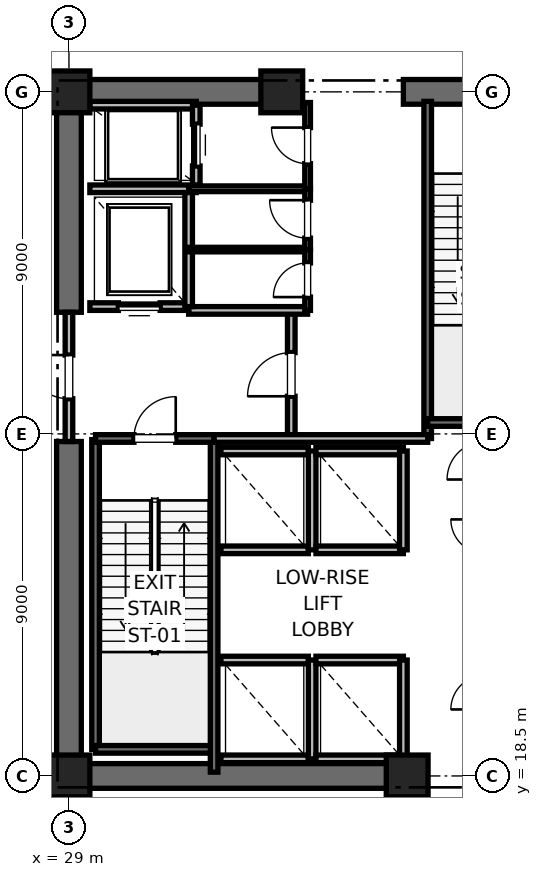
"""IFC4 building model, lengths in metres.
Left out: names, types, materials, properties, quantities, classifications, styles, units other than length and angle.
Written with IfcOpenShell. Run it as: python <this file> out.ifc"""

import sys

from ifc_helpers import new_model, si_unit, direction, frame, frame_2d, origin, origin_2d, place, context, subcontext, project, spatial, rectangle, extrude, element, fill, save


model = new_model("IFC4")
c1 = context("Model", 3, precision=1e-05, world=origin(), true_north=direction((0.0, 1.0)))
c2 = subcontext(c1, "Body", "Model", "MODEL_VIEW")
j1 = project(units=[si_unit("LENGTHUNIT", "METRE"), si_unit("PLANEANGLEUNIT", "RADIAN")], contexts=[c1])
p1 = place(None, origin())
s1 = spatial("IfcSite", under=j1, at=p1, CompositionType="ELEMENT")
p2 = place(p1, origin())
s2 = spatial("IfcBuilding", under=s1, at=p2, CompositionType="ELEMENT")
p3 = place(p2, frame((0.0, 0.0, 11.2)))
s3 = spatial("IfcBuildingStorey", under=s2, at=p3, CompositionType="ELEMENT", Elevation=11.2)
for number, where, z_axis, x_axis in (
    (1, (29.0, 18.5, 0.0), (0.0, 0.0, 1.0), (1.0, 0.0, 0.0)),
    (2, (29.0, 36.5, 0.0), (0.0, 0.0, 1.0), (1.0, 0.0, 0.0)),
    (3, (37.9, 18.5, 0.0), (0.0, 0.0, 1.0), (1.0, 0.0, 0.0)),
    (4, (34.6, 36.5, 0.0), (0.0, 0.0, 1.0), (1.0, 0.0, 0.0)),
):
    element("IfcColumn", number, at=place(p3, frame(where, z_axis=z_axis, x_axis=x_axis)), inside=s3, PredefinedType="PILASTER", context=c2, shape_type="SweptSolid", body=[
        extrude(rectangle(XDim=1.1, YDim=1.1, at=origin_2d()), origin(), (0.0, 0.0, 1.0), 5.2),
    ])
p4 = place(p3, frame((29.0, 18.5, 0.0), z_axis=(0.0, 0.0, 1.0), x_axis=(1.0, 0.0, 0.0)))
e5 = element("IfcWall", 5, at=p4, inside=s3, PredefinedType="SHEAR", context=c2, shape_type="SweptSolid", body=[
    extrude(rectangle(XDim=9.2, YDim=0.65, at=frame_2d((4.6, 0.0))), origin(), (0.0, 0.0, 1.0), 4.92),
])
p5 = place(p3, frame((29.0, 36.5, 0.0), z_axis=(0.0, 0.0, 1.0), x_axis=(1.0, 0.0, 0.0)))
e6 = element("IfcWall", 6, at=p5, inside=s3, PredefinedType="SHEAR", context=c2, shape_type="SweptSolid", body=[
    extrude(rectangle(XDim=5.8, YDim=0.65, at=frame_2d((2.9, 0.0))), origin(), (0.0, 0.0, 1.0), 4.92),
])
p6 = place(p3, frame((37.8, 36.5, 0.0), z_axis=(0.0, 0.0, 1.0), x_axis=(1.0, 0.0, 0.0)))
e7 = element("IfcWall", 7, at=p6, inside=s3, PredefinedType="SHEAR", context=c2, shape_type="SweptSolid", body=[
    extrude(rectangle(XDim=4.4, YDim=0.65, at=frame_2d((2.2, 0.0))), origin(), (0.0, 0.0, 1.0), 4.92),
])
p7 = place(p6, frame((1.65, 0.0, 0.0)))
e8 = element("IfcOpeningElement", 8, at=p7, cuts=e7, PredefinedType="OPENING", context=c2, shape_type="SweptSolid", body=[
    extrude(rectangle(XDim=1.1, YDim=2.15, at=frame_2d((0.55, 1.075))), frame((0.0, 0.325, 0.0), z_axis=(0.0, -1.0, 0.0), x_axis=(1.0, 0.0, 0.0)), (0.0, 0.0, 1.0), 0.65),
])
p8 = place(p3, frame((29.0, 18.5, 0.0), z_axis=(0.0, 0.0, 1.0), x_axis=(0.0, 1.0, 0.0)))
e9 = element("IfcWall", 9, at=p8, inside=s3, PredefinedType="SHEAR", context=c2, shape_type="SweptSolid", body=[
    extrude(rectangle(XDim=8.8, YDim=0.65, at=frame_2d((4.4, 0.0))), origin(), (0.0, 0.0, 1.0), 4.92),
])
p9 = place(p3, frame((29.0, 30.7, 0.0), z_axis=(0.0, 0.0, 1.0), x_axis=(0.0, 1.0, 0.0)))
e10 = element("IfcWall", 10, at=p9, inside=s3, PredefinedType="SHEAR", context=c2, shape_type="SweptSolid", body=[
    extrude(rectangle(XDim=5.8, YDim=0.65, at=frame_2d((2.9, 0.0))), origin(), (0.0, 0.0, 1.0), 4.92),
])
p10 = place(p3, frame((29.7, 19.2, 0.0), z_axis=(0.0, 0.0, 1.0), x_axis=(0.0, 1.0, 0.0)))
e11 = element("IfcWall", 11, at=p10, inside=s3, PredefinedType="SOLIDWALL", context=c2, shape_type="SweptSolid", body=[
    extrude(rectangle(XDim=8.15, YDim=0.2, at=frame_2d((4.075, 0.0))), origin(), (0.0, 0.0, 1.0), 4.92),
])
p11 = place(p3, frame((29.7, 19.2, 0.0), z_axis=(0.0, 0.0, 1.0), x_axis=(1.0, 0.0, 0.0)))
e12 = element("IfcWall", 12, at=p11, inside=s3, PredefinedType="SOLIDWALL", context=c2, shape_type="SweptSolid", body=[
    extrude(rectangle(XDim=3.12, YDim=0.2, at=frame_2d((1.56, 0.0))), origin(), (0.0, 0.0, 1.0), 4.92),
])
p12 = place(p3, frame((32.82, 18.6, 0.0), z_axis=(0.0, 0.0, 1.0), x_axis=(0.0, 1.0, 0.0)))
e13 = element("IfcWall", 13, at=p12, inside=s3, PredefinedType="SOLIDWALL", context=c2, shape_type="SweptSolid", body=[
    extrude(rectangle(XDim=8.78, YDim=0.2, at=frame_2d((4.39, 0.0))), origin(), (0.0, 0.0, 1.0), 4.92),
])
p13 = place(p3, frame((29.7, 27.38, 0.0), z_axis=(0.0, 0.0, 1.0), x_axis=(1.0, 0.0, 0.0)))
e14 = element("IfcWall", 14, at=p13, inside=s3, PredefinedType="SOLIDWALL", context=c2, shape_type="SweptSolid", body=[
    extrude(rectangle(XDim=3.12, YDim=0.2, at=frame_2d((1.56, 0.0))), origin(), (0.0, 0.0, 1.0), 4.92),
])
p14 = place(p13, frame((1.01, 0.0, 0.0)))
e15 = element("IfcOpeningElement", 15, at=p14, cuts=e14, PredefinedType="OPENING", context=c2, shape_type="SweptSolid", body=[
    extrude(rectangle(XDim=1.1, YDim=2.15, at=frame_2d((0.55, 1.075))), frame((0.0, 0.1, 0.0), z_axis=(0.0, -1.0, 0.0), x_axis=(1.0, 0.0, 0.0)), (0.0, 0.0, 1.0), 0.2),
])
p15 = place(p3, frame((38.44, 27.38, 0.0), z_axis=(0.0, 0.0, 1.0), x_axis=(0.0, 1.0, 0.0)))
e16 = element("IfcWall", 16, at=p15, inside=s3, PredefinedType="SOLIDWALL", context=c2, shape_type="SweptSolid", body=[
    extrude(rectangle(XDim=8.87, YDim=0.2, at=frame_2d((4.435, 0.0))), origin(), (0.0, 0.0, 1.0), 4.92),
])
p16 = place(p3, frame((38.44, 27.8, 0.0), z_axis=(0.0, 0.0, 1.0), x_axis=(1.0, 0.0, 0.0)))
e17 = element("IfcWall", 17, at=p16, inside=s3, PredefinedType="SOLIDWALL", context=c2, shape_type="SweptSolid", body=[
    extrude(rectangle(XDim=3.32, YDim=0.2, at=frame_2d((1.66, 0.0))), origin(), (0.0, 0.0, 1.0), 4.92),
])
p17 = place(p3, frame((34.85, 27.38, 0.0), z_axis=(0.0, 0.0, 1.0), x_axis=(0.0, 1.0, 0.0)))
e18 = element("IfcWall", 18, at=p17, inside=s3, PredefinedType="PARTITIONING", context=c2, shape_type="SweptSolid", body=[
    extrude(rectangle(XDim=3.37, YDim=0.2, at=frame_2d((1.685, 0.0))), origin(), (0.0, 0.0, 1.0), 4.92),
])
p18 = place(p17, frame((1.11, 0.0, 0.0)))
e19 = element("IfcOpeningElement", 19, at=p18, cuts=e18, PredefinedType="OPENING", context=c2, shape_type="SweptSolid", body=[
    extrude(rectangle(XDim=1.15, YDim=2.2, at=frame_2d((0.575, 1.1))), frame((0.0, 0.1, 0.0), z_axis=(0.0, -1.0, 0.0), x_axis=(1.0, 0.0, 0.0)), (0.0, 0.0, 1.0), 0.2),
])
p19 = place(p3, frame((29.0, 27.3, 0.0), z_axis=(0.0, 0.0, 1.0), x_axis=(0.0, 1.0, 0.0)))
e20 = element("IfcWall", 20, at=p19, inside=s3, PredefinedType="PARTITIONING", context=c2, shape_type="SweptSolid", body=[
    extrude(rectangle(XDim=3.4, YDim=0.2, at=frame_2d((1.7, 0.0))), origin(), (0.0, 0.0, 1.0), 3.7),
])
p20 = place(p19, frame((1.125, 0.0, 0.0)))
e21 = element("IfcOpeningElement", 21, at=p20, cuts=e20, PredefinedType="OPENING", context=c2, shape_type="SweptSolid", body=[
    extrude(rectangle(XDim=1.15, YDim=2.2, at=frame_2d((0.575, 1.1))), frame((0.0, 0.1, 0.0), z_axis=(0.0, -1.0, 0.0), x_axis=(1.0, 0.0, 0.0)), (0.0, 0.0, 1.0), 0.2),
])
p21 = place(p3, frame((32.82, 27.38, 0.0), z_axis=(0.0, 0.0, 1.0), x_axis=(1.0, 0.0, 0.0)))
e22 = element("IfcWall", 22, at=p21, inside=s3, PredefinedType="PARTITIONING", context=c2, shape_type="SweptSolid", body=[
    extrude(rectangle(XDim=5.62, YDim=0.2, at=frame_2d((2.81, 0.0))), origin(), (0.0, 0.0, 1.0), 4.92),
])
p22 = place(p3, frame((32.15, 30.75, 0.0), z_axis=(0.0, 0.0, 1.0), x_axis=(1.0, 0.0, 0.0)))
e23 = element("IfcWall", 23, at=p22, inside=s3, PredefinedType="PARTITIONING", context=c2, shape_type="SweptSolid", body=[
    extrude(rectangle(XDim=3.13, YDim=0.2, at=frame_2d((1.565, 0.0))), origin(), (0.0, 0.0, 1.0), 4.92),
])
p23 = place(p3, frame((29.55, 30.85, 0.0), z_axis=(0.0, 0.0, 1.0), x_axis=(1.0, 0.0, 0.0)))
e24 = element("IfcWall", 24, at=p23, inside=s3, PredefinedType="SOLIDWALL", context=c2, shape_type="SweptSolid", body=[
    extrude(rectangle(XDim=2.6, YDim=0.2, at=frame_2d((1.3, 0.0))), origin(), (0.0, 0.0, 1.0), 3.7),
])
p24 = place(p23, frame((0.75, 0.0, 0.0)))
e25 = element("IfcOpeningElement", 25, at=p24, cuts=e24, PredefinedType="OPENING", context=c2, shape_type="SweptSolid", body=[
    extrude(rectangle(XDim=1.1, YDim=2.2, at=frame_2d((0.55, 1.1))), frame((0.0, 0.1, 0.0), z_axis=(0.0, -1.0, 0.0), x_axis=(1.0, 0.0, 0.0)), (0.0, 0.0, 1.0), 0.2),
])
p25 = place(p3, frame((29.55, 33.95, 0.0), z_axis=(0.0, 0.0, 1.0), x_axis=(1.0, 0.0, 0.0)))
e26 = element("IfcWall", 26, at=p25, inside=s3, PredefinedType="SOLIDWALL", context=c2, shape_type="SweptSolid", body=[
    extrude(rectangle(XDim=2.8, YDim=0.2, at=frame_2d((1.4, 0.0))), origin(), (0.0, 0.0, 1.0), 4.92),
])
p26 = place(p3, frame((32.15, 30.85, 0.0), z_axis=(0.0, 0.0, 1.0), x_axis=(0.0, 1.0, 0.0)))
e27 = element("IfcWall", 27, at=p26, inside=s3, PredefinedType="SOLIDWALL", context=c2, shape_type="SweptSolid", body=[
    extrude(rectangle(XDim=3.0, YDim=0.2, at=frame_2d((1.5, 0.0))), origin(), (0.0, 0.0, 1.0), 4.92),
])
p27 = place(p3, frame((32.35, 36.15, 0.0), z_axis=(0.0, 0.0, 1.0), x_axis=(-1.0, 0.0, 0.0)))
e28 = element("IfcWall", 28, at=p27, inside=s3, PredefinedType="SOLIDWALL", context=c2, shape_type="SweptSolid", body=[
    extrude(rectangle(XDim=2.8, YDim=0.2, at=frame_2d((1.4, 0.0))), origin(), (0.0, 0.0, 1.0), 3.979),
])
p28 = place(p3, frame((32.35, 34.05, 0.0), z_axis=(0.0, 0.0, 1.0), x_axis=(0.0, 1.0, 0.0)))
e29 = element("IfcWall", 29, at=p28, inside=s3, PredefinedType="SOLIDWALL", context=c2, shape_type="SweptSolid", body=[
    extrude(rectangle(XDim=2.1, YDim=0.2, at=frame_2d((1.05, 0.0))), origin(), (0.0, 0.0, 1.0), 4.92),
])
p29 = place(p28, frame((0.5, 0.0, 0.0)))
e30 = element("IfcOpeningElement", 30, at=p29, cuts=e29, PredefinedType="OPENING", context=c2, shape_type="SweptSolid", body=[
    extrude(rectangle(XDim=1.1, YDim=2.2, at=frame_2d((0.55, 1.1))), frame((0.0, 0.1, 0.0), z_axis=(0.0, -1.0, 0.0), x_axis=(1.0, 0.0, 0.0)), (0.0, 0.0, 1.0), 0.2),
])
for number, where, z_axis, x_axis in (
    (31, (33.0, 18.95, 0.0), (0.0, 0.0, 1.0), (1.0, 0.0, 0.0)),
    (32, (35.3, 21.55, 0.0), (0.0, 0.0, 1.0), (-1.0, 0.0, 0.0)),
):
    element("IfcWall", number, at=place(p3, frame(where, z_axis=z_axis, x_axis=x_axis)), inside=s3, PredefinedType="SOLIDWALL", context=c2, shape_type="SweptSolid", body=[
        extrude(rectangle(XDim=2.3, YDim=0.2, at=frame_2d((1.15, 0.0))), origin(), (0.0, 0.0, 1.0), 4.92),
    ])
p30 = place(p3, frame((35.4, 18.95, 0.0), z_axis=(0.0, 0.0, 1.0), x_axis=(0.0, 1.0, 0.0)))
e33 = element("IfcWall", 33, at=p30, inside=s3, PredefinedType="SOLIDWALL", context=c2, shape_type="SweptSolid", body=[
    extrude(rectangle(XDim=2.6, YDim=0.2, at=frame_2d((1.3, 0.0))), origin(), (0.0, 0.0, 1.0), 4.92),
])
p31 = place(p3, frame((35.5, 18.95, 0.0), z_axis=(0.0, 0.0, 1.0), x_axis=(1.0, 0.0, 0.0)))
e34 = element("IfcWall", 34, at=p31, inside=s3, PredefinedType="SOLIDWALL", context=c2, shape_type="SweptSolid", body=[
    extrude(rectangle(XDim=2.3, YDim=0.2, at=frame_2d((1.15, 0.0))), origin(), (0.0, 0.0, 1.0), 3.7),
])
p32 = place(p3, frame((37.8, 21.55, 0.0), z_axis=(0.0, 0.0, 1.0), x_axis=(-1.0, 0.0, 0.0)))
e35 = element("IfcWall", 35, at=p32, inside=s3, PredefinedType="SOLIDWALL", context=c2, shape_type="SweptSolid", body=[
    extrude(rectangle(XDim=2.3, YDim=0.2, at=frame_2d((1.15, 0.0))), origin(), (0.0, 0.0, 1.0), 4.92),
])
p33 = place(p3, frame((37.8, 18.95, 0.0), z_axis=(0.0, 0.0, 1.0), x_axis=(0.0, 1.0, 0.0)))
e36 = element("IfcWall", 36, at=p33, inside=s3, PredefinedType="SOLIDWALL", context=c2, shape_type="SweptSolid", body=[
    extrude(rectangle(XDim=2.6, YDim=0.2, at=frame_2d((1.3, 0.0))), origin(), (0.0, 0.0, 1.0), 3.7),
])
for number, where, z_axis, x_axis in (
    (37, (33.0, 24.45, 0.0), (0.0, 0.0, 1.0), (1.0, 0.0, 0.0)),
    (38, (35.3, 27.05, 0.0), (0.0, 0.0, 1.0), (-1.0, 0.0, 0.0)),
):
    element("IfcWall", number, at=place(p3, frame(where, z_axis=z_axis, x_axis=x_axis)), inside=s3, PredefinedType="SOLIDWALL", context=c2, shape_type="SweptSolid", body=[
        extrude(rectangle(XDim=2.3, YDim=0.2, at=frame_2d((1.15, 0.0))), origin(), (0.0, 0.0, 1.0), 4.92),
    ])
p34 = place(p3, frame((35.4, 24.45, 0.0), z_axis=(0.0, 0.0, 1.0), x_axis=(0.0, 1.0, 0.0)))
e39 = element("IfcWall", 39, at=p34, inside=s3, PredefinedType="SOLIDWALL", context=c2, shape_type="SweptSolid", body=[
    extrude(rectangle(XDim=2.6, YDim=0.2, at=frame_2d((1.3, 0.0))), origin(), (0.0, 0.0, 1.0), 4.92),
])
for number, where, z_axis, x_axis in (
    (40, (35.5, 24.45, 0.0), (0.0, 0.0, 1.0), (1.0, 0.0, 0.0)),
    (41, (37.8, 27.05, 0.0), (0.0, 0.0, 1.0), (-1.0, 0.0, 0.0)),
):
    element("IfcWall", number, at=place(p3, frame(where, z_axis=z_axis, x_axis=x_axis)), inside=s3, PredefinedType="SOLIDWALL", context=c2, shape_type="SweptSolid", body=[
        extrude(rectangle(XDim=2.3, YDim=0.2, at=frame_2d((1.15, 0.0))), origin(), (0.0, 0.0, 1.0), 4.92),
    ])
p35 = place(p3, frame((37.8, 24.45, 0.0), z_axis=(0.0, 0.0, 1.0), x_axis=(0.0, 1.0, 0.0)))
e42 = element("IfcWall", 42, at=p35, inside=s3, PredefinedType="SOLIDWALL", context=c2, shape_type="SweptSolid", body=[
    extrude(rectangle(XDim=2.6, YDim=0.2, at=frame_2d((1.3, 0.0))), origin(), (0.0, 0.0, 1.0), 4.92),
])
p36 = place(p3, frame((32.15, 33.95, 0.0), z_axis=(0.0, 0.0, 1.0), x_axis=(1.0, 0.0, 0.0)))
e43 = element("IfcWall", 43, at=p36, inside=s3, PredefinedType="PARTITIONING", context=c2, shape_type="SweptSolid", body=[
    extrude(rectangle(XDim=3.13, YDim=0.15, at=frame_2d((1.565, 0.0))), origin(), (0.0, 0.0, 1.0), 2.85),
])
p37 = place(p3, frame((35.28, 33.95, 0.0), z_axis=(0.0, 0.0, 1.0), x_axis=(0.0, 1.0, 0.0)))
e44 = element("IfcWall", 44, at=p37, inside=s3, PredefinedType="PARTITIONING", context=c2, shape_type="SweptSolid", body=[
    extrude(rectangle(XDim=2.27, YDim=0.15, at=frame_2d((1.135, 0.0))), origin(), (0.0, 0.0, 1.0), 2.85),
])
p38 = place(p37, frame((0.66, 0.0, 0.0)))
e45 = element("IfcOpeningElement", 45, at=p38, cuts=e44, PredefinedType="OPENING", context=c2, shape_type="SweptSolid", body=[
    extrude(rectangle(XDim=0.95, YDim=2.15, at=frame_2d((0.475, 1.075))), frame((0.0, 0.075, 0.0), z_axis=(0.0, -1.0, 0.0), x_axis=(1.0, 0.0, 0.0)), (0.0, 0.0, 1.0), 0.15),
])
p39 = place(p3, frame((32.15, 32.35, 0.0), z_axis=(0.0, 0.0, 1.0), x_axis=(1.0, 0.0, 0.0)))
e46 = element("IfcWall", 46, at=p39, inside=s3, PredefinedType="PARTITIONING", context=c2, shape_type="SweptSolid", body=[
    extrude(rectangle(XDim=3.13, YDim=0.12, at=frame_2d((1.565, 0.0))), origin(), (0.0, 0.0, 1.0), 2.85),
])
p40 = place(p3, frame((35.28, 30.75, 0.0), z_axis=(0.0, 0.0, 1.0), x_axis=(0.0, 1.0, 0.0)))
e47 = element("IfcWall", 47, at=p40, inside=s3, PredefinedType="PARTITIONING", context=c2, shape_type="SweptSolid", body=[
    extrude(rectangle(XDim=1.6, YDim=0.15, at=frame_2d((0.8, 0.0))), origin(), (0.0, 0.0, 1.0), 2.85),
])
p41 = place(p40, frame((0.35, 0.0, 0.0)))
e48 = element("IfcOpeningElement", 48, at=p41, cuts=e47, PredefinedType="OPENING", context=c2, shape_type="SweptSolid", body=[
    extrude(rectangle(XDim=0.9, YDim=2.1, at=frame_2d((0.45, 1.05))), frame((0.0, 0.075, 0.0), z_axis=(0.0, -1.0, 0.0), x_axis=(1.0, 0.0, 0.0)), (0.0, 0.0, 1.0), 0.15),
])
p42 = place(p3, frame((35.28, 32.35, 0.0), z_axis=(0.0, 0.0, 1.0), x_axis=(0.0, 1.0, 0.0)))
e49 = element("IfcWall", 49, at=p42, inside=s3, PredefinedType="PARTITIONING", context=c2, shape_type="SweptSolid", body=[
    extrude(rectangle(XDim=1.6, YDim=0.15, at=frame_2d((0.8, 0.0))), origin(), (0.0, 0.0, 1.0), 2.85),
])
p43 = place(p42, frame((0.3, 0.0, 0.0)))
e50 = element("IfcOpeningElement", 50, at=p43, cuts=e49, PredefinedType="OPENING", context=c2, shape_type="SweptSolid", body=[
    extrude(rectangle(XDim=1.0, YDim=2.15, at=frame_2d((0.5, 1.075))), frame((0.0, 0.075, 0.0), z_axis=(0.0, -1.0, 0.0), x_axis=(1.0, 0.0, 0.0)), (0.0, 0.0, 1.0), 0.15),
])
p44 = place(p14, origin())
e51 = element("IfcDoor", 51, at=p44, inside=s3, OperationType="SINGLE_SWING_RIGHT", PredefinedType="DOOR", context=c2, shape_type="SweptSolid", body=[
    extrude(rectangle(XDim=1.1, YDim=2.15, at=frame_2d((0.55, 1.075))), frame((0.0, 0.025, 0.0), z_axis=(0.0, -1.0, 0.0), x_axis=(1.0, 0.0, 0.0)), (0.0, 0.0, 1.0), 0.05),
])
fill(e15, e51)
p45 = place(p18, origin())
e52 = element("IfcDoor", 52, at=p45, inside=s3, OperationType="SINGLE_SWING_LEFT", PredefinedType="DOOR", context=c2, shape_type="SweptSolid", body=[
    extrude(rectangle(XDim=1.15, YDim=2.2, at=frame_2d((0.575, 1.1))), frame((0.0, 0.025, 0.0), z_axis=(0.0, -1.0, 0.0), x_axis=(1.0, 0.0, 0.0)), (0.0, 0.0, 1.0), 0.05),
])
fill(e19, e52)
p46 = place(p20, origin())
e53 = element("IfcDoor", 53, at=p46, inside=s3, OperationType="SINGLE_SWING_RIGHT", PredefinedType="DOOR", context=c2, shape_type="SweptSolid", body=[
    extrude(rectangle(XDim=1.15, YDim=2.2, at=frame_2d((0.575, 1.1))), frame((0.0, 0.025, 0.0), z_axis=(0.0, -1.0, 0.0), x_axis=(1.0, 0.0, 0.0)), (0.0, 0.0, 1.0), 0.05),
])
fill(e21, e53)
p47 = place(p24, origin())
e54 = element("IfcDoor", 54, at=p47, inside=s3, OperationType="SLIDING_TO_RIGHT", PredefinedType="DOOR", context=c2, shape_type="SweptSolid", body=[
    extrude(rectangle(XDim=1.1, YDim=2.2, at=frame_2d((0.55, 1.1))), frame((0.0, 0.025, 0.0), z_axis=(0.0, -1.0, 0.0), x_axis=(1.0, 0.0, 0.0)), (0.0, 0.0, 1.0), 0.05),
])
fill(e25, e54)
p48 = place(p29, origin())
e55 = element("IfcDoor", 55, at=p48, inside=s3, OperationType="SLIDING_TO_RIGHT", PredefinedType="DOOR", context=c2, shape_type="SweptSolid", body=[
    extrude(rectangle(XDim=1.1, YDim=2.2, at=frame_2d((0.55, 1.1))), frame((0.0, 0.025, 0.0), z_axis=(0.0, -1.0, 0.0), x_axis=(1.0, 0.0, 0.0)), (0.0, 0.0, 1.0), 0.05),
])
fill(e30, e55)
p49 = place(p38, origin())
e56 = element("IfcDoor", 56, at=p49, inside=s3, OperationType="SINGLE_SWING_RIGHT", PredefinedType="DOOR", context=c2, shape_type="SweptSolid", body=[
    extrude(rectangle(XDim=0.95, YDim=2.15, at=frame_2d((0.475, 1.075))), frame((0.0, 0.025, 0.0), z_axis=(0.0, -1.0, 0.0), x_axis=(1.0, 0.0, 0.0)), (0.0, 0.0, 1.0), 0.05),
])
fill(e45, e56)
p50 = place(p41, origin())
e57 = element("IfcDoor", 57, at=p50, inside=s3, OperationType="SINGLE_SWING_LEFT", PredefinedType="DOOR", context=c2, shape_type="SweptSolid", body=[
    extrude(rectangle(XDim=0.9, YDim=2.1, at=frame_2d((0.45, 1.05))), frame((0.0, 0.025, 0.0), z_axis=(0.0, -1.0, 0.0), x_axis=(1.0, 0.0, 0.0)), (0.0, 0.0, 1.0), 0.05),
])
fill(e48, e57)
p51 = place(p43, origin())
e58 = element("IfcDoor", 58, at=p51, inside=s3, OperationType="SINGLE_SWING_RIGHT", PredefinedType="DOOR", context=c2, shape_type="SweptSolid", body=[
    extrude(rectangle(XDim=1.0, YDim=2.15, at=frame_2d((0.5, 1.075))), frame((0.0, 0.025, 0.0), z_axis=(0.0, -1.0, 0.0), x_axis=(1.0, 0.0, 0.0)), (0.0, 0.0, 1.0), 0.05),
])
fill(e50, e58)
save(model, sys.argv[1])
